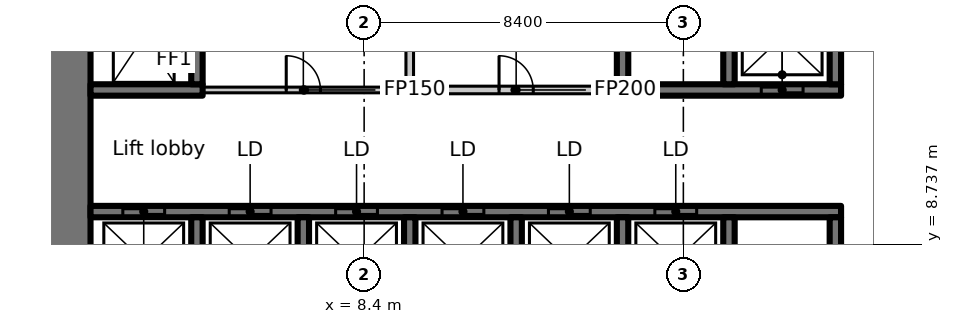
"""IFC4 building model, lengths in metres.
Left out: names, types, materials, properties, quantities, classifications, styles, units other than length and angle.
Written with IfcOpenShell. Run it as: python <this file> out.ifc"""

import sys

from ifc_helpers import new_model, si_unit, direction, frame, frame_2d, origin, place, context, subcontext, project, spatial, rectangle, extrude, element, fill, save


model = new_model("IFC4")
c1 = context("Model", 3, precision=1e-05, world=origin(), true_north=direction((0.0, 1.0)))
c2 = subcontext(c1, "Body", "Model", "MODEL_VIEW")
j1 = project(units=[si_unit("LENGTHUNIT", "METRE"), si_unit("PLANEANGLEUNIT", "RADIAN")], contexts=[c1])
p1 = place(None, origin())
s1 = spatial("IfcSite", under=j1, at=p1, CompositionType="ELEMENT")
p2 = place(p1, origin())
s2 = spatial("IfcBuilding", under=s1, at=p2, CompositionType="ELEMENT")
p3 = place(p2, frame((0.0, 0.0, -6.0)))
s3 = spatial("IfcBuildingStorey", under=s2, at=p3, CompositionType="ELEMENT", Elevation=-6.0)
p4 = place(p3, frame((0.6, 6.736, 0.0), z_axis=(0.0, 0.0, 1.0), x_axis=(0.0, 1.0, 0.0)))
e1 = element("IfcWall", 1, at=p4, inside=s3, PredefinedType="SHEAR", context=c2, shape_type="SweptSolid", body=[
    extrude(rectangle(XDim=8.864, YDim=1.2, at=frame_2d((4.432, 0.0))), origin(), (0.0, 0.0, 1.0), 5.6),
])
p5 = place(p3, frame((1.2, 9.6, 0.0), z_axis=(0.0, 0.0, 1.0), x_axis=(1.0, 0.0, 0.0)))
e2 = element("IfcWall", 2, at=p5, inside=s3, PredefinedType="SHEAR", context=c2, shape_type="SweptSolid", body=[
    extrude(rectangle(XDim=19.75, YDim=0.3, at=frame_2d((9.875, 0.0))), origin(), (0.0, 0.0, 1.0), 5.6),
])
p6 = place(p5, frame((0.85, 0.0, 0.0)))
e3 = element("IfcOpeningElement", 3, at=p6, cuts=e2, PredefinedType="OPENING", context=c2, shape_type="SweptSolid", body=[
    extrude(rectangle(XDim=1.1, YDim=2.3, at=frame_2d((0.55, 1.15))), frame((0.0, 0.16, 0.0), z_axis=(0.0, -1.0, 0.0), x_axis=(1.0, 0.0, 0.0)), (0.0, 0.0, 1.0), 0.32),
])
p7 = place(p5, frame((3.65, 0.0, 0.0)))
e4 = element("IfcOpeningElement", 4, at=p7, cuts=e2, PredefinedType="OPENING", context=c2, shape_type="SweptSolid", body=[
    extrude(rectangle(XDim=1.1, YDim=2.3, at=frame_2d((0.55, 1.15))), frame((0.0, 0.16, 0.0), z_axis=(0.0, -1.0, 0.0), x_axis=(1.0, 0.0, 0.0)), (0.0, 0.0, 1.0), 0.32),
])
p8 = place(p5, frame((6.45, 0.0, 0.0)))
e5 = element("IfcOpeningElement", 5, at=p8, cuts=e2, PredefinedType="OPENING", context=c2, shape_type="SweptSolid", body=[
    extrude(rectangle(XDim=1.1, YDim=2.3, at=frame_2d((0.55, 1.15))), frame((0.0, 0.16, 0.0), z_axis=(0.0, -1.0, 0.0), x_axis=(1.0, 0.0, 0.0)), (0.0, 0.0, 1.0), 0.32),
])
p9 = place(p5, frame((9.25, 0.0, 0.0)))
e6 = element("IfcOpeningElement", 6, at=p9, cuts=e2, PredefinedType="OPENING", context=c2, shape_type="SweptSolid", body=[
    extrude(rectangle(XDim=1.1, YDim=2.3, at=frame_2d((0.55, 1.15))), frame((0.0, 0.16, 0.0), z_axis=(0.0, -1.0, 0.0), x_axis=(1.0, 0.0, 0.0)), (0.0, 0.0, 1.0), 0.32),
])
p10 = place(p5, frame((12.05, 0.0, 0.0)))
e7 = element("IfcOpeningElement", 7, at=p10, cuts=e2, PredefinedType="OPENING", context=c2, shape_type="SweptSolid", body=[
    extrude(rectangle(XDim=1.1, YDim=2.3, at=frame_2d((0.55, 1.15))), frame((0.0, 0.16, 0.0), z_axis=(0.0, -1.0, 0.0), x_axis=(1.0, 0.0, 0.0)), (0.0, 0.0, 1.0), 0.32),
])
p11 = place(p5, frame((14.85, 0.0, 0.0)))
e8 = element("IfcOpeningElement", 8, at=p11, cuts=e2, PredefinedType="OPENING", context=c2, shape_type="SweptSolid", body=[
    extrude(rectangle(XDim=1.1, YDim=2.3, at=frame_2d((0.55, 1.15))), frame((0.0, 0.16, 0.0), z_axis=(0.0, -1.0, 0.0), x_axis=(1.0, 0.0, 0.0)), (0.0, 0.0, 1.0), 0.32),
])
for number, where, z_axis, x_axis in (
    (9, (4.0, 7.15, 0.0), (0.0, 0.0, 1.0), (0.0, 1.0, 0.0)),
    (10, (6.8, 7.15, 0.0), (0.0, 0.0, 1.0), (0.0, 1.0, 0.0)),
    (11, (9.6, 7.15, 0.0), (0.0, 0.0, 1.0), (0.0, 1.0, 0.0)),
    (12, (12.4, 7.15, 0.0), (0.0, 0.0, 1.0), (0.0, 1.0, 0.0)),
    (13, (15.2, 7.15, 0.0), (0.0, 0.0, 1.0), (0.0, 1.0, 0.0)),
    (14, (18.0, 7.15, 0.0), (0.0, 0.0, 1.0), (0.0, 1.0, 0.0)),
    (15, (20.8, 7.15, 0.0), (0.0, 0.0, 1.0), (0.0, 1.0, 0.0)),
):
    element("IfcWall", number, at=place(p3, frame(where, z_axis=z_axis, x_axis=x_axis)), inside=s3, PredefinedType="SHEAR", context=c2, shape_type="SweptSolid", body=[
        extrude(rectangle(XDim=2.3, YDim=0.3, at=frame_2d((1.15, 0.0))), origin(), (0.0, 0.0, 1.0), 5.6),
    ])
p12 = place(p3, frame((1.2, 12.8, 0.0), z_axis=(0.0, 0.0, 1.0), x_axis=(1.0, 0.0, 0.0)))
e16 = element("IfcWall", 16, at=p12, inside=s3, PredefinedType="SHEAR", context=c2, shape_type="SweptSolid", body=[
    extrude(rectangle(XDim=2.95, YDim=0.3, at=frame_2d((1.475, 0.0))), origin(), (0.0, 0.0, 1.0), 5.6),
])
p13 = place(p3, frame((4.0, 12.95, 0.0), z_axis=(0.0, 0.0, 1.0), x_axis=(0.0, 1.0, 0.0)))
e17 = element("IfcWall", 17, at=p13, inside=s3, PredefinedType="SHEAR", context=c2, shape_type="SweptSolid", body=[
    extrude(rectangle(XDim=2.65, YDim=0.3, at=frame_2d((1.325, 0.0))), origin(), (0.0, 0.0, 1.0), 5.6),
])
p14 = place(p3, frame((15.05, 12.8, 0.0), z_axis=(0.0, 0.0, 1.0), x_axis=(1.0, 0.0, 0.0)))
e18 = element("IfcWall", 18, at=p14, inside=s3, PredefinedType="SHEAR", context=c2, shape_type="SweptSolid", body=[
    extrude(rectangle(XDim=5.9, YDim=0.3, at=frame_2d((2.95, 0.0))), origin(), (0.0, 0.0, 1.0), 5.6),
])
p15 = place(p14, frame((3.8, 0.0, 0.0)))
e19 = element("IfcOpeningElement", 19, at=p15, cuts=e18, PredefinedType="OPENING", context=c2, shape_type="SweptSolid", body=[
    extrude(rectangle(XDim=1.1, YDim=2.3, at=frame_2d((0.55, 1.15))), frame((0.0, 0.16, 0.0), z_axis=(0.0, -1.0, 0.0), x_axis=(1.0, 0.0, 0.0)), (0.0, 0.0, 1.0), 0.32),
])
for number, where, z_axis, x_axis in (
    (20, (15.2, 12.95, 0.0), (0.0, 0.0, 1.0), (0.0, 1.0, 0.0)),
    (21, (18.0, 12.95, 0.0), (0.0, 0.0, 1.0), (0.0, 1.0, 0.0)),
    (22, (20.8, 12.95, 0.0), (0.0, 0.0, 1.0), (0.0, 1.0, 0.0)),
):
    element("IfcWall", number, at=place(p3, frame(where, z_axis=z_axis, x_axis=x_axis)), inside=s3, PredefinedType="SHEAR", context=c2, shape_type="SweptSolid", body=[
        extrude(rectangle(XDim=2.65, YDim=0.3, at=frame_2d((1.325, 0.0))), origin(), (0.0, 0.0, 1.0), 5.6),
    ])
p16 = place(p3, frame((9.6, 15.588, 0.0), z_axis=(0.0, 0.0, 1.0), x_axis=(0.0, -1.0, 0.0)))
e23 = element("IfcWall", 23, at=p16, inside=s3, PredefinedType="PARTITIONING", context=c2, shape_type="SweptSolid", body=[
    extrude(rectangle(XDim=2.788, YDim=0.2, at=frame_2d((1.394, 0.0))), origin(), (0.0, 0.0, 1.0), 5.6),
])
p17 = place(p3, frame((9.7, 12.8, 0.0), z_axis=(0.0, 0.0, 1.0), x_axis=(1.0, 0.0, 0.0)))
e24 = element("IfcWall", 24, at=p17, inside=s3, PredefinedType="PARTITIONING", context=c2, shape_type="SweptSolid", body=[
    extrude(rectangle(XDim=5.338, YDim=0.2, at=frame_2d((2.669, 0.0))), origin(), (0.0, 0.0, 1.0), 5.6),
])
p18 = place(p17, frame((2.25, 0.0, 0.0)))
e25 = element("IfcOpeningElement", 25, at=p18, cuts=e24, PredefinedType="OPENING", context=c2, shape_type="SweptSolid", body=[
    extrude(rectangle(XDim=0.9, YDim=2.1, at=frame_2d((0.45, 1.05))), frame((0.0, 0.11, 0.0), z_axis=(0.0, -1.0, 0.0), x_axis=(1.0, 0.0, 0.0)), (0.0, 0.0, 1.0), 0.22),
])
p19 = place(p3, frame((4.162, 12.8, 0.0), z_axis=(0.0, 0.0, 1.0), x_axis=(1.0, 0.0, 0.0)))
e26 = element("IfcWall", 26, at=p19, inside=s3, PredefinedType="PARTITIONING", context=c2, shape_type="SweptSolid", body=[
    extrude(rectangle(XDim=5.338, YDim=0.15, at=frame_2d((2.669, 0.0))), origin(), (0.0, 0.0, 1.0), 5.6),
])
p20 = place(p19, frame((2.188, 0.0, 0.0)))
e27 = element("IfcOpeningElement", 27, at=p20, cuts=e26, PredefinedType="OPENING", context=c2, shape_type="SweptSolid", body=[
    extrude(rectangle(XDim=0.9, YDim=2.1, at=frame_2d((0.45, 1.05))), frame((0.0, 0.085, 0.0), z_axis=(0.0, -1.0, 0.0), x_axis=(1.0, 0.0, 0.0)), (0.0, 0.0, 1.0), 0.17),
])
p21 = place(p6, origin())
e28 = element("IfcDoor", 28, at=p21, inside=s3, OperationType="SLIDING_TO_LEFT", PredefinedType="DOOR", context=c2, shape_type="SweptSolid", body=[
    extrude(rectangle(XDim=1.1, YDim=2.3, at=frame_2d((0.55, 1.15))), frame((0.0, 0.025, 0.0), z_axis=(0.0, -1.0, 0.0), x_axis=(1.0, 0.0, 0.0)), (0.0, 0.0, 1.0), 0.05),
])
fill(e3, e28)
p22 = place(p7, origin())
e29 = element("IfcDoor", 29, at=p22, inside=s3, OperationType="SLIDING_TO_LEFT", PredefinedType="DOOR", context=c2, shape_type="SweptSolid", body=[
    extrude(rectangle(XDim=1.1, YDim=2.3, at=frame_2d((0.55, 1.15))), frame((0.0, 0.025, 0.0), z_axis=(0.0, -1.0, 0.0), x_axis=(1.0, 0.0, 0.0)), (0.0, 0.0, 1.0), 0.05),
])
fill(e4, e29)
p23 = place(p8, origin())
e30 = element("IfcDoor", 30, at=p23, inside=s3, OperationType="SLIDING_TO_LEFT", PredefinedType="DOOR", context=c2, shape_type="SweptSolid", body=[
    extrude(rectangle(XDim=1.1, YDim=2.3, at=frame_2d((0.55, 1.15))), frame((0.0, 0.025, 0.0), z_axis=(0.0, -1.0, 0.0), x_axis=(1.0, 0.0, 0.0)), (0.0, 0.0, 1.0), 0.05),
])
fill(e5, e30)
p24 = place(p9, origin())
e31 = element("IfcDoor", 31, at=p24, inside=s3, OperationType="SLIDING_TO_LEFT", PredefinedType="DOOR", context=c2, shape_type="SweptSolid", body=[
    extrude(rectangle(XDim=1.1, YDim=2.3, at=frame_2d((0.55, 1.15))), frame((0.0, 0.025, 0.0), z_axis=(0.0, -1.0, 0.0), x_axis=(1.0, 0.0, 0.0)), (0.0, 0.0, 1.0), 0.05),
])
fill(e6, e31)
p25 = place(p10, origin())
e32 = element("IfcDoor", 32, at=p25, inside=s3, OperationType="SLIDING_TO_LEFT", PredefinedType="DOOR", context=c2, shape_type="SweptSolid", body=[
    extrude(rectangle(XDim=1.1, YDim=2.3, at=frame_2d((0.55, 1.15))), frame((0.0, 0.025, 0.0), z_axis=(0.0, -1.0, 0.0), x_axis=(1.0, 0.0, 0.0)), (0.0, 0.0, 1.0), 0.05),
])
fill(e7, e32)
p26 = place(p11, origin())
e33 = element("IfcDoor", 33, at=p26, inside=s3, OperationType="SLIDING_TO_LEFT", PredefinedType="DOOR", context=c2, shape_type="SweptSolid", body=[
    extrude(rectangle(XDim=1.1, YDim=2.3, at=frame_2d((0.55, 1.15))), frame((0.0, 0.025, 0.0), z_axis=(0.0, -1.0, 0.0), x_axis=(1.0, 0.0, 0.0)), (0.0, 0.0, 1.0), 0.05),
])
fill(e8, e33)
p27 = place(p15, origin())
e34 = element("IfcDoor", 34, at=p27, inside=s3, OperationType="SLIDING_TO_LEFT", PredefinedType="DOOR", context=c2, shape_type="SweptSolid", body=[
    extrude(rectangle(XDim=1.1, YDim=2.3, at=frame_2d((0.55, 1.15))), frame((0.0, 0.025, 0.0), z_axis=(0.0, -1.0, 0.0), x_axis=(1.0, 0.0, 0.0)), (0.0, 0.0, 1.0), 0.05),
])
fill(e19, e34)
p28 = place(p20, origin())
e35 = element("IfcDoor", 35, at=p28, inside=s3, OperationType="SINGLE_SWING_LEFT", PredefinedType="DOOR", context=c2, shape_type="SweptSolid", body=[
    extrude(rectangle(XDim=0.9, YDim=2.1, at=frame_2d((0.45, 1.05))), frame((0.0, 0.025, 0.0), z_axis=(0.0, -1.0, 0.0), x_axis=(1.0, 0.0, 0.0)), (0.0, 0.0, 1.0), 0.05),
])
fill(e27, e35)
p29 = place(p18, origin())
e36 = element("IfcDoor", 36, at=p29, inside=s3, OperationType="SINGLE_SWING_RIGHT", PredefinedType="DOOR", context=c2, shape_type="SweptSolid", body=[
    extrude(rectangle(XDim=0.9, YDim=2.1, at=frame_2d((0.45, 1.05))), frame((0.0, 0.025, 0.0), z_axis=(0.0, -1.0, 0.0), x_axis=(1.0, 0.0, 0.0)), (0.0, 0.0, 1.0), 0.05),
])
fill(e25, e36)
save(model, sys.argv[1])
